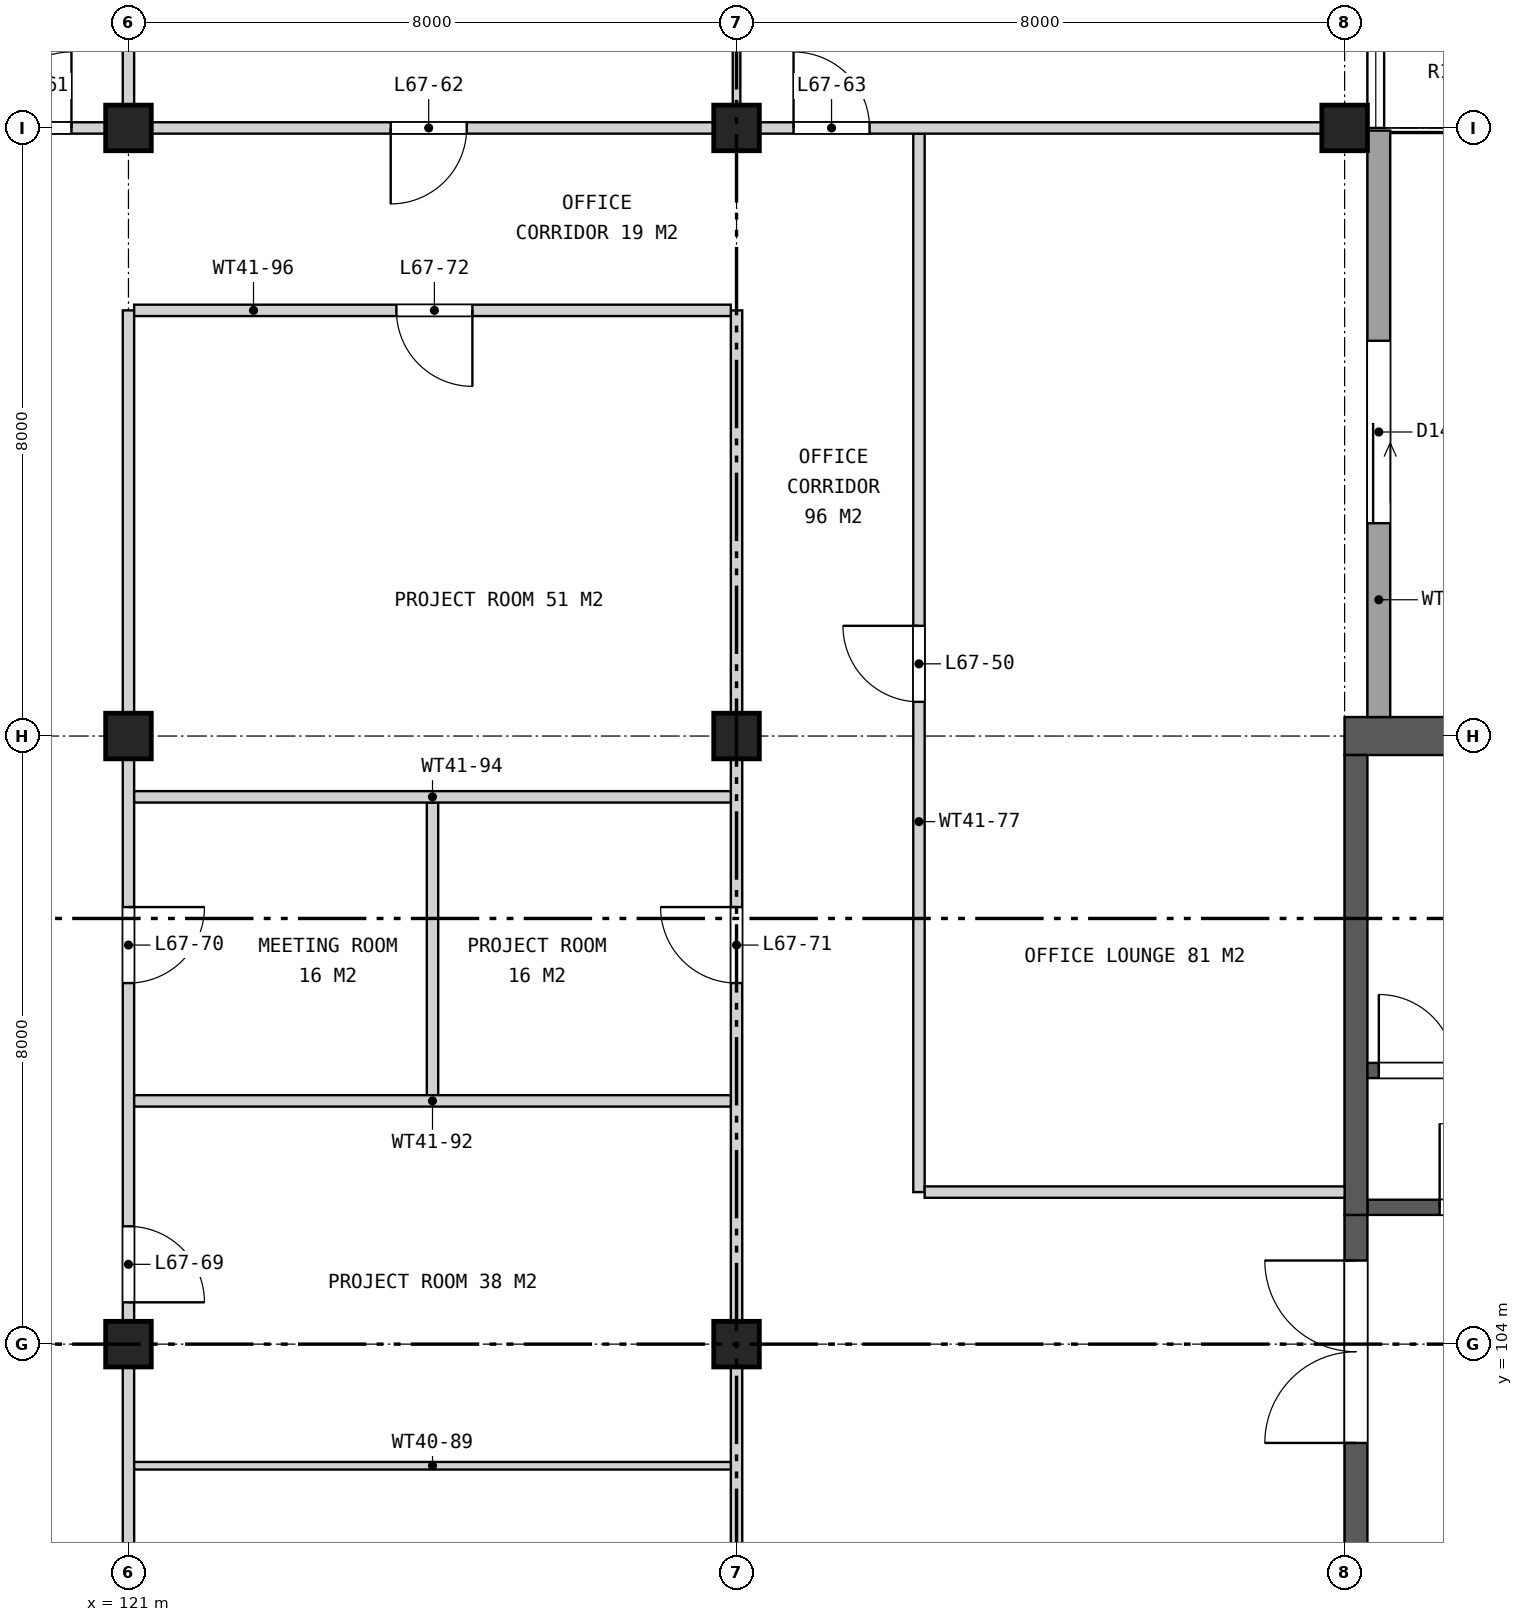
"""IFC4 building model, lengths in metres.
Left out: names, types, materials, properties, quantities, classifications, styles, units other than length and angle.
Written with IfcOpenShell. Run it as: python <this file> out.ifc"""

import sys

from ifc_helpers import new_model, si_unit, direction, frame, frame_2d, origin, origin_2d, place, context, subcontext, project, spatial, rectangle, extrude, element, fill, save


model = new_model("IFC4")
c1 = context("Model", 3, precision=1e-05, world=origin(), true_north=direction((0.0, 1.0)))
c2 = subcontext(c1, "Body", "Model", "MODEL_VIEW")
j1 = project(units=[si_unit("LENGTHUNIT", "METRE"), si_unit("PLANEANGLEUNIT", "RADIAN")], contexts=[c1])
p1 = place(None, origin())
s1 = spatial("IfcSite", under=j1, at=p1, CompositionType="ELEMENT")
p2 = place(p1, origin())
s2 = spatial("IfcBuilding", under=s1, at=p2, CompositionType="ELEMENT")
p3 = place(p2, frame((0.0, 0.0, 311.3)))
s3 = spatial("IfcBuildingStorey", under=s2, at=p3, CompositionType="ELEMENT", Elevation=311.3)
for number, where, z_axis, x_axis in (
    (1, (121.0, 104.0, 0.0), (0.0, 0.0, 1.0), (1.0, 0.0, 0.0)),
    (2, (121.0, 112.0, 0.0), (0.0, 0.0, 1.0), (1.0, 0.0, 0.0)),
    (3, (121.0, 120.0, 0.0), (0.0, 0.0, 1.0), (1.0, 0.0, 0.0)),
    (4, (129.0, 104.0, 0.0), (0.0, 0.0, 1.0), (1.0, 0.0, 0.0)),
    (5, (129.0, 112.0, 0.0), (0.0, 0.0, 1.0), (1.0, 0.0, 0.0)),
    (6, (129.0, 120.0, 0.0), (0.0, 0.0, 1.0), (1.0, 0.0, 0.0)),
    (7, (137.0, 120.0, 0.0), (0.0, 0.0, 1.0), (1.0, 0.0, 0.0)),
):
    element("IfcColumn", number, at=place(p3, frame(where, z_axis=z_axis, x_axis=x_axis)), inside=s3, PredefinedType="COLUMN", context=c2, shape_type="SweptSolid", body=[
        extrude(rectangle(XDim=0.6, YDim=0.6, at=origin_2d()), origin(), (0.0, 0.0, 1.0), 4.2),
    ])
p4 = place(p3, frame((137.0, 112.0, 0.0), z_axis=(0.0, 0.0, 1.0), x_axis=(1.0, 0.0, 0.0)))
e8 = element("IfcWall", 8, at=p4, inside=s3, PredefinedType="SHEAR", context=c2, shape_type="SweptSolid", body=[
    extrude(rectangle(XDim=7.1, YDim=0.5, at=frame_2d((3.55, 0.0))), origin(), (0.0, 0.0, 1.0), 4.2),
])
p5 = place(p3, frame((137.15, 94.3, 0.0), z_axis=(0.0, 0.0, 1.0), x_axis=(0.0, 1.0, 0.0)))
e9 = element("IfcWall", 9, at=p5, inside=s3, PredefinedType="SHEAR", context=c2, shape_type="SweptSolid", body=[
    extrude(rectangle(XDim=11.4, YDim=0.3, at=frame_2d((5.7, 0.0))), origin(), (0.0, 0.0, 1.0), 4.2),
])
p6 = place(p5, frame((0.6, 0.0, 0.0)))
e10 = element("IfcOpeningElement", 10, at=p6, cuts=e9, PredefinedType="OPENING", context=c2, shape_type="SweptSolid", body=[
    extrude(rectangle(XDim=2.4, YDim=2.4, at=frame_2d((1.2, 1.2))), frame((0.0, 0.16, 0.0), z_axis=(0.0, -1.0, 0.0), x_axis=(1.0, 0.0, 0.0)), (0.0, 0.0, 1.0), 0.32),
])
p7 = place(p5, frame((4.5, 0.0, 0.0)))
e11 = element("IfcOpeningElement", 11, at=p7, cuts=e9, PredefinedType="OPENING", context=c2, shape_type="SweptSolid", body=[
    extrude(rectangle(XDim=2.4, YDim=2.4, at=frame_2d((1.2, 1.2))), frame((0.0, 0.16, 0.0), z_axis=(0.0, -1.0, 0.0), x_axis=(1.0, 0.0, 0.0)), (0.0, 0.0, 1.0), 0.32),
])
p8 = place(p5, frame((8.4, 0.0, 0.0)))
e12 = element("IfcOpeningElement", 12, at=p8, cuts=e9, PredefinedType="OPENING", context=c2, shape_type="SweptSolid", body=[
    extrude(rectangle(XDim=2.4, YDim=2.4, at=frame_2d((1.2, 1.2))), frame((0.0, 0.16, 0.0), z_axis=(0.0, -1.0, 0.0), x_axis=(1.0, 0.0, 0.0)), (0.0, 0.0, 1.0), 0.32),
])
p9 = place(p3, frame((137.3, 105.8, 0.0), z_axis=(0.0, 0.0, 1.0), x_axis=(1.0, 0.0, 0.0)))
e13 = element("IfcWall", 13, at=p9, inside=s3, PredefinedType="SHEAR", context=c2, shape_type="SweptSolid", body=[
    extrude(rectangle(XDim=15.45, YDim=0.2, at=frame_2d((7.725, 0.0))), origin(), (0.0, 0.0, 1.0), 4.2),
])
p10 = place(p9, frame((0.95, 0.0, 0.0)))
e14 = element("IfcOpeningElement", 14, at=p10, cuts=e13, PredefinedType="OPENING", context=c2, shape_type="SweptSolid", body=[
    extrude(rectangle(XDim=1.1, YDim=2.1, at=frame_2d((0.55, 1.05))), frame((0.0, 0.11, 0.0), z_axis=(0.0, -1.0, 0.0), x_axis=(1.0, 0.0, 0.0)), (0.0, 0.0, 1.0), 0.22),
])
p11 = place(p3, frame((137.15, 105.7, 0.0), z_axis=(0.0, 0.0, 1.0), x_axis=(0.0, 1.0, 0.0)))
e15 = element("IfcWall", 15, at=p11, inside=s3, PredefinedType="SHEAR", context=c2, shape_type="SweptSolid", body=[
    extrude(rectangle(XDim=6.05, YDim=0.3, at=frame_2d((3.025, 0.0))), origin(), (0.0, 0.0, 1.0), 4.2),
])
p12 = place(p3, frame((137.3, 107.6, 0.0), z_axis=(0.0, 0.0, 1.0), x_axis=(1.0, 0.0, 0.0)))
e16 = element("IfcWall", 16, at=p12, inside=s3, PredefinedType="SHEAR", context=c2, shape_type="SweptSolid", body=[
    extrude(rectangle(XDim=6.8, YDim=0.2, at=frame_2d((3.4, 0.0))), origin(), (0.0, 0.0, 1.0), 4.2),
])
p13 = place(p12, frame((0.15, 0.0, 0.0)))
e17 = element("IfcOpeningElement", 17, at=p13, cuts=e16, PredefinedType="OPENING", context=c2, shape_type="SweptSolid", body=[
    extrude(rectangle(XDim=1.0, YDim=2.1, at=frame_2d((0.5, 1.05))), frame((0.0, 0.11, 0.0), z_axis=(0.0, -1.0, 0.0), x_axis=(1.0, 0.0, 0.0)), (0.0, 0.0, 1.0), 0.22),
])
p14 = place(p3, frame((137.45, 112.25, 0.0), z_axis=(0.0, 0.0, 1.0), x_axis=(0.0, 1.0, 0.0)))
e18 = element("IfcWall", 18, at=p14, inside=s3, PredefinedType="SOLIDWALL", context=c2, shape_type="SweptSolid", body=[
    extrude(rectangle(XDim=7.715, YDim=0.3, at=frame_2d((3.857, 0.0))), origin(), (0.0, 0.0, 1.0), 3.544),
])
p15 = place(p14, frame((2.55, 0.0, 0.0)))
e19 = element("IfcOpeningElement", 19, at=p15, cuts=e18, PredefinedType="OPENING", context=c2, shape_type="SweptSolid", body=[
    extrude(rectangle(XDim=2.4, YDim=2.4, at=frame_2d((1.2, 1.2))), frame((0.0, 0.16, 0.0), z_axis=(0.0, -1.0, 0.0), x_axis=(1.0, 0.0, 0.0)), (0.0, 0.0, 1.0), 0.32),
])
p16 = place(p3, frame((121.0, 82.4, 0.0), z_axis=(0.0, 0.0, 1.0), x_axis=(0.0, 1.0, 0.0)))
e20 = element("IfcWall", 20, at=p16, inside=s3, PredefinedType="PARTITIONING", context=c2, shape_type="SweptSolid", body=[
    extrude(rectangle(XDim=35.2, YDim=0.15, at=frame_2d((17.6, 0.0))), origin(), (0.0, 0.0, 1.0), 3.443),
])
p17 = place(p16, frame((8.25, 0.0, 0.0)))
e21 = element("IfcOpeningElement", 21, at=p17, cuts=e20, PredefinedType="OPENING", context=c2, shape_type="SweptSolid", body=[
    extrude(rectangle(XDim=1.0, YDim=2.1, at=frame_2d((0.5, 1.05))), frame((0.0, 0.085, 0.0), z_axis=(0.0, -1.0, 0.0), x_axis=(1.0, 0.0, 0.0)), (0.0, 0.0, 1.0), 0.17),
])
p18 = place(p16, frame((22.15, 0.0, 0.0)))
e22 = element("IfcOpeningElement", 22, at=p18, cuts=e20, PredefinedType="OPENING", context=c2, shape_type="SweptSolid", body=[
    extrude(rectangle(XDim=1.0, YDim=2.1, at=frame_2d((0.5, 1.05))), frame((0.0, 0.085, 0.0), z_axis=(0.0, -1.0, 0.0), x_axis=(1.0, 0.0, 0.0)), (0.0, 0.0, 1.0), 0.17),
])
p19 = place(p16, frame((26.35, 0.0, 0.0)))
e23 = element("IfcOpeningElement", 23, at=p19, cuts=e20, PredefinedType="OPENING", context=c2, shape_type="SweptSolid", body=[
    extrude(rectangle(XDim=1.0, YDim=2.1, at=frame_2d((0.5, 1.05))), frame((0.0, 0.085, 0.0), z_axis=(0.0, -1.0, 0.0), x_axis=(1.0, 0.0, 0.0)), (0.0, 0.0, 1.0), 0.17),
])
p20 = place(p3, frame((121.0, 120.075, 0.0), z_axis=(0.0, 0.0, 1.0), x_axis=(0.0, 1.0, 0.0)))
e24 = element("IfcWall", 24, at=p20, inside=s3, PredefinedType="PARTITIONING", context=c2, shape_type="SweptSolid", body=[
    extrude(rectangle(XDim=8.145, YDim=0.15, at=frame_2d((4.073, 0.0))), origin(), (0.0, 0.0, 1.0), 3.443),
])
p21 = place(p3, frame((125.0, 107.275, 0.0), z_axis=(0.0, 0.0, 1.0), x_axis=(0.0, 1.0, 0.0)))
e25 = element("IfcWall", 25, at=p21, inside=s3, PredefinedType="PARTITIONING", context=c2, shape_type="SweptSolid", body=[
    extrude(rectangle(XDim=3.85, YDim=0.15, at=frame_2d((1.925, 0.0))), origin(), (0.0, 0.0, 1.0), 3.443),
])
p22 = place(p3, frame((129.0, 82.4, 0.0), z_axis=(0.0, 0.0, 1.0), x_axis=(0.0, 1.0, 0.0)))
e26 = element("IfcWall", 26, at=p22, inside=s3, PredefinedType="PARTITIONING", context=c2, shape_type="SweptSolid", body=[
    extrude(rectangle(XDim=35.2, YDim=0.15, at=frame_2d((17.6, 0.0))), origin(), (0.0, 0.0, 1.0), 3.443),
])
p23 = place(p22, frame((8.25, 0.0, 0.0)))
e27 = element("IfcOpeningElement", 27, at=p23, cuts=e26, PredefinedType="OPENING", context=c2, shape_type="SweptSolid", body=[
    extrude(rectangle(XDim=1.0, YDim=2.1, at=frame_2d((0.5, 1.05))), frame((0.0, 0.085, 0.0), z_axis=(0.0, -1.0, 0.0), x_axis=(1.0, 0.0, 0.0)), (0.0, 0.0, 1.0), 0.17),
])
p24 = place(p22, frame((15.85, 0.0, 0.0)))
e28 = element("IfcOpeningElement", 28, at=p24, cuts=e26, PredefinedType="OPENING", context=c2, shape_type="SweptSolid", body=[
    extrude(rectangle(XDim=1.0, YDim=2.1, at=frame_2d((0.5, 1.05))), frame((0.0, 0.085, 0.0), z_axis=(0.0, -1.0, 0.0), x_axis=(1.0, 0.0, 0.0)), (0.0, 0.0, 1.0), 0.17),
])
p25 = place(p22, frame((26.35, 0.0, 0.0)))
e29 = element("IfcOpeningElement", 29, at=p25, cuts=e26, PredefinedType="OPENING", context=c2, shape_type="SweptSolid", body=[
    extrude(rectangle(XDim=1.0, YDim=2.1, at=frame_2d((0.5, 1.05))), frame((0.0, 0.085, 0.0), z_axis=(0.0, -1.0, 0.0), x_axis=(1.0, 0.0, 0.0)), (0.0, 0.0, 1.0), 0.17),
])
p26 = place(p3, frame((129.0, 120.075, 0.0), z_axis=(0.0, 0.0, 1.0), x_axis=(0.0, 1.0, 0.0)))
e30 = element("IfcWall", 30, at=p26, inside=s3, PredefinedType="PARTITIONING", context=c2, shape_type="SweptSolid", body=[
    extrude(rectangle(XDim=8.145, YDim=0.1, at=frame_2d((4.073, 0.0))), origin(), (0.0, 0.0, 1.0), 3.443),
])
p27 = place(p3, frame((131.4, 106.0, 0.0), z_axis=(0.0, 0.0, 1.0), x_axis=(0.0, 1.0, 0.0)))
e31 = element("IfcWall", 31, at=p27, inside=s3, PredefinedType="PARTITIONING", context=c2, shape_type="SweptSolid", body=[
    extrude(rectangle(XDim=13.925, YDim=0.15, at=frame_2d((6.962, 0.0))), origin(), (0.0, 0.0, 1.0), 3.443),
])
p28 = place(p27, frame((6.45, 0.0, 0.0)))
e32 = element("IfcOpeningElement", 32, at=p28, cuts=e31, PredefinedType="OPENING", context=c2, shape_type="SweptSolid", body=[
    extrude(rectangle(XDim=1.0, YDim=2.1, at=frame_2d((0.5, 1.05))), frame((0.0, 0.085, 0.0), z_axis=(0.0, -1.0, 0.0), x_axis=(1.0, 0.0, 0.0)), (0.0, 0.0, 1.0), 0.17),
])
p29 = place(p3, frame((121.075, 102.4, 0.0), z_axis=(0.0, 0.0, 1.0), x_axis=(1.0, 0.0, 0.0)))
e33 = element("IfcWall", 33, at=p29, inside=s3, PredefinedType="PARTITIONING", context=c2, shape_type="SweptSolid", body=[
    extrude(rectangle(XDim=7.85, YDim=0.1, at=frame_2d((3.925, 0.0))), origin(), (0.0, 0.0, 1.0), 3.443),
])
p30 = place(p3, frame((131.475, 106.0, 0.0), z_axis=(0.0, 0.0, 1.0), x_axis=(1.0, 0.0, 0.0)))
e34 = element("IfcWall", 34, at=p30, inside=s3, PredefinedType="PARTITIONING", context=c2, shape_type="SweptSolid", body=[
    extrude(rectangle(XDim=5.525, YDim=0.15, at=frame_2d((2.762, 0.0))), origin(), (0.0, 0.0, 1.0), 3.443),
])
for number, where, z_axis, x_axis in (
    (35, (121.075, 107.2, 0.0), (0.0, 0.0, 1.0), (1.0, 0.0, 0.0)),
    (36, (121.075, 111.2, 0.0), (0.0, 0.0, 1.0), (1.0, 0.0, 0.0)),
):
    element("IfcWall", number, at=place(p3, frame(where, z_axis=z_axis, x_axis=x_axis)), inside=s3, PredefinedType="PARTITIONING", context=c2, shape_type="SweptSolid", body=[
        extrude(rectangle(XDim=7.85, YDim=0.15, at=frame_2d((3.925, 0.0))), origin(), (0.0, 0.0, 1.0), 3.443),
    ])
p31 = place(p3, frame((121.075, 117.6, 0.0), z_axis=(0.0, 0.0, 1.0), x_axis=(1.0, 0.0, 0.0)))
e37 = element("IfcWall", 37, at=p31, inside=s3, PredefinedType="PARTITIONING", context=c2, shape_type="SweptSolid", body=[
    extrude(rectangle(XDim=7.85, YDim=0.15, at=frame_2d((3.925, 0.0))), origin(), (0.0, 0.0, 1.0), 3.443),
])
p32 = place(p31, frame((3.45, 0.0, 0.0)))
e38 = element("IfcOpeningElement", 38, at=p32, cuts=e37, PredefinedType="OPENING", context=c2, shape_type="SweptSolid", body=[
    extrude(rectangle(XDim=1.0, YDim=2.1, at=frame_2d((0.5, 1.05))), frame((0.0, 0.085, 0.0), z_axis=(0.0, -1.0, 0.0), x_axis=(1.0, 0.0, 0.0)), (0.0, 0.0, 1.0), 0.17),
])
p33 = place(p3, frame((112.78, 120.0, 0.0), z_axis=(0.0, 0.0, 1.0), x_axis=(1.0, 0.0, 0.0)))
e39 = element("IfcWall", 39, at=p33, inside=s3, PredefinedType="PARTITIONING", context=c2, shape_type="SweptSolid", body=[
    extrude(rectangle(XDim=24.44, YDim=0.15, at=frame_2d((12.22, 0.0))), origin(), (0.0, 0.0, 1.0), 3.443),
])
p34 = place(p33, frame((6.47, 0.0, 0.0)))
e40 = element("IfcOpeningElement", 40, at=p34, cuts=e39, PredefinedType="OPENING", context=c2, shape_type="SweptSolid", body=[
    extrude(rectangle(XDim=1.0, YDim=2.1, at=frame_2d((0.5, 1.05))), frame((0.0, 0.085, 0.0), z_axis=(0.0, -1.0, 0.0), x_axis=(1.0, 0.0, 0.0)), (0.0, 0.0, 1.0), 0.17),
])
p35 = place(p33, frame((11.67, 0.0, 0.0)))
e41 = element("IfcOpeningElement", 41, at=p35, cuts=e39, PredefinedType="OPENING", context=c2, shape_type="SweptSolid", body=[
    extrude(rectangle(XDim=1.0, YDim=2.1, at=frame_2d((0.5, 1.05))), frame((0.0, 0.085, 0.0), z_axis=(0.0, -1.0, 0.0), x_axis=(1.0, 0.0, 0.0)), (0.0, 0.0, 1.0), 0.17),
])
p36 = place(p33, frame((16.97, 0.0, 0.0)))
e42 = element("IfcOpeningElement", 42, at=p36, cuts=e39, PredefinedType="OPENING", context=c2, shape_type="SweptSolid", body=[
    extrude(rectangle(XDim=1.0, YDim=2.1, at=frame_2d((0.5, 1.05))), frame((0.0, 0.085, 0.0), z_axis=(0.0, -1.0, 0.0), x_axis=(1.0, 0.0, 0.0)), (0.0, 0.0, 1.0), 0.17),
])
p37 = place(p8, origin())
e43 = element("IfcDoor", 43, at=p37, inside=s3, OperationType="DOUBLE_DOOR_SINGLE_SWING", PredefinedType="DOOR", context=c2, shape_type="SweptSolid", body=[
    extrude(rectangle(XDim=2.4, YDim=2.4, at=frame_2d((1.2, 1.2))), frame((0.0, 0.025, 0.0), z_axis=(0.0, -1.0, 0.0), x_axis=(1.0, 0.0, 0.0)), (0.0, 0.0, 1.0), 0.05),
])
fill(e12, e43)
p38 = place(p10, origin())
e44 = element("IfcDoor", 44, at=p38, inside=s3, OperationType="SINGLE_SWING_LEFT", PredefinedType="DOOR", context=c2, shape_type="SweptSolid", body=[
    extrude(rectangle(XDim=1.1, YDim=2.1, at=frame_2d((0.55, 1.05))), frame((0.0, 0.025, 0.0), z_axis=(0.0, -1.0, 0.0), x_axis=(1.0, 0.0, 0.0)), (0.0, 0.0, 1.0), 0.05),
])
fill(e14, e44)
p39 = place(p13, origin())
e45 = element("IfcDoor", 45, at=p39, inside=s3, OperationType="SINGLE_SWING_LEFT", PredefinedType="DOOR", context=c2, shape_type="SweptSolid", body=[
    extrude(rectangle(XDim=1.0, YDim=2.1, at=frame_2d((0.5, 1.05))), frame((0.0, 0.025, 0.0), z_axis=(0.0, -1.0, 0.0), x_axis=(1.0, 0.0, 0.0)), (0.0, 0.0, 1.0), 0.05),
])
fill(e17, e45)
p40 = place(p15, frame((2.4, 0.0, 0.0), z_axis=(0.0, 0.0, 1.0), x_axis=(-1.0, 0.0, 0.0)))
e46 = element("IfcDoor", 46, at=p40, inside=s3, OperationType="SLIDING_TO_LEFT", PredefinedType="DOOR", context=c2, shape_type="SweptSolid", body=[
    extrude(rectangle(XDim=2.4, YDim=2.4, at=frame_2d((1.2, 1.2))), frame((0.0, 0.025, 0.0), z_axis=(0.0, -1.0, 0.0), x_axis=(1.0, 0.0, 0.0)), (0.0, 0.0, 1.0), 0.05),
])
fill(e19, e46)
p41 = place(p28, origin())
e47 = element("IfcDoor", 47, at=p41, inside=s3, OperationType="SINGLE_SWING_RIGHT", PredefinedType="DOOR", context=c2, shape_type="SweptSolid", body=[
    extrude(rectangle(XDim=1.0, YDim=2.1, at=frame_2d((0.5, 1.05))), frame((0.0, 0.025, 0.0), z_axis=(0.0, -1.0, 0.0), x_axis=(1.0, 0.0, 0.0)), (0.0, 0.0, 1.0), 0.05),
])
fill(e32, e47)
p42 = place(p34, origin())
e48 = element("IfcDoor", 48, at=p42, inside=s3, OperationType="SINGLE_SWING_RIGHT", PredefinedType="DOOR", context=c2, shape_type="SweptSolid", body=[
    extrude(rectangle(XDim=1.0, YDim=2.1, at=frame_2d((0.5, 1.05))), frame((0.0, 0.025, 0.0), z_axis=(0.0, -1.0, 0.0), x_axis=(1.0, 0.0, 0.0)), (0.0, 0.0, 1.0), 0.05),
])
fill(e40, e48)
p43 = place(p35, frame((1.0, 0.0, 0.0), z_axis=(0.0, 0.0, 1.0), x_axis=(-1.0, 0.0, 0.0)))
e49 = element("IfcDoor", 49, at=p43, inside=s3, OperationType="SINGLE_SWING_RIGHT", PredefinedType="DOOR", context=c2, shape_type="SweptSolid", body=[
    extrude(rectangle(XDim=1.0, YDim=2.1, at=frame_2d((0.5, 1.05))), frame((0.0, 0.025, 0.0), z_axis=(0.0, -1.0, 0.0), x_axis=(1.0, 0.0, 0.0)), (0.0, 0.0, 1.0), 0.05),
])
fill(e41, e49)
p44 = place(p36, origin())
e50 = element("IfcDoor", 50, at=p44, inside=s3, OperationType="SINGLE_SWING_LEFT", PredefinedType="DOOR", context=c2, shape_type="SweptSolid", body=[
    extrude(rectangle(XDim=1.0, YDim=2.1, at=frame_2d((0.5, 1.05))), frame((0.0, 0.025, 0.0), z_axis=(0.0, -1.0, 0.0), x_axis=(1.0, 0.0, 0.0)), (0.0, 0.0, 1.0), 0.05),
])
fill(e42, e50)
p45 = place(p18, frame((1.0, 0.0, 0.0), z_axis=(0.0, 0.0, 1.0), x_axis=(-1.0, 0.0, 0.0)))
e51 = element("IfcDoor", 51, at=p45, inside=s3, OperationType="SINGLE_SWING_RIGHT", PredefinedType="DOOR", context=c2, shape_type="SweptSolid", body=[
    extrude(rectangle(XDim=1.0, YDim=2.1, at=frame_2d((0.5, 1.05))), frame((0.0, 0.025, 0.0), z_axis=(0.0, -1.0, 0.0), x_axis=(1.0, 0.0, 0.0)), (0.0, 0.0, 1.0), 0.05),
])
fill(e22, e51)
p46 = place(p19, frame((1.0, 0.0, 0.0), z_axis=(0.0, 0.0, 1.0), x_axis=(-1.0, 0.0, 0.0)))
e52 = element("IfcDoor", 52, at=p46, inside=s3, OperationType="SINGLE_SWING_LEFT", PredefinedType="DOOR", context=c2, shape_type="SweptSolid", body=[
    extrude(rectangle(XDim=1.0, YDim=2.1, at=frame_2d((0.5, 1.05))), frame((0.0, 0.025, 0.0), z_axis=(0.0, -1.0, 0.0), x_axis=(1.0, 0.0, 0.0)), (0.0, 0.0, 1.0), 0.05),
])
fill(e23, e52)
p47 = place(p25, origin())
e53 = element("IfcDoor", 53, at=p47, inside=s3, OperationType="SINGLE_SWING_RIGHT", PredefinedType="DOOR", context=c2, shape_type="SweptSolid", body=[
    extrude(rectangle(XDim=1.0, YDim=2.1, at=frame_2d((0.5, 1.05))), frame((0.0, 0.025, 0.0), z_axis=(0.0, -1.0, 0.0), x_axis=(1.0, 0.0, 0.0)), (0.0, 0.0, 1.0), 0.05),
])
fill(e29, e53)
p48 = place(p32, frame((1.0, 0.0, 0.0), z_axis=(0.0, 0.0, 1.0), x_axis=(-1.0, 0.0, 0.0)))
e54 = element("IfcDoor", 54, at=p48, inside=s3, OperationType="SINGLE_SWING_LEFT", PredefinedType="DOOR", context=c2, shape_type="SweptSolid", body=[
    extrude(rectangle(XDim=1.0, YDim=2.1, at=frame_2d((0.5, 1.05))), frame((0.0, 0.025, 0.0), z_axis=(0.0, -1.0, 0.0), x_axis=(1.0, 0.0, 0.0)), (0.0, 0.0, 1.0), 0.05),
])
fill(e38, e54)
save(model, sys.argv[1])
